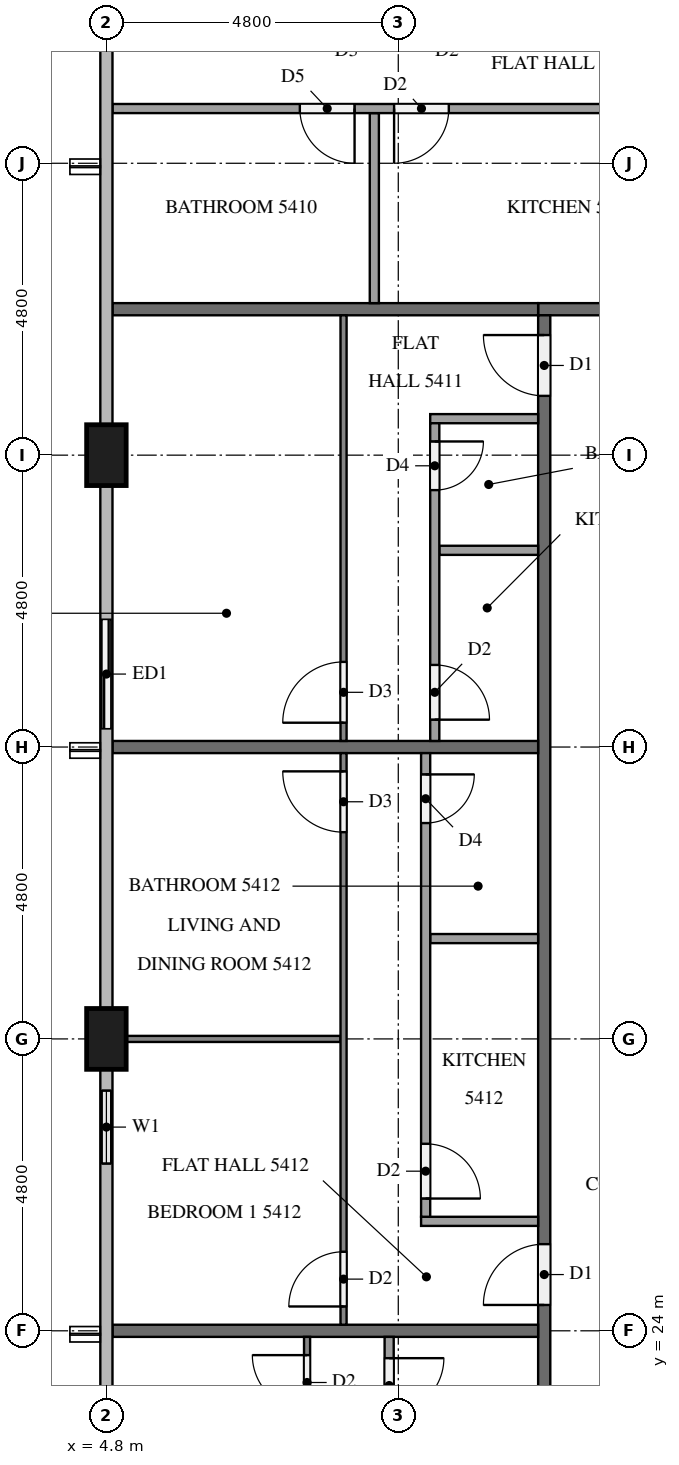
"""IFC4 building model, lengths in metres.
Left out: names, types, materials, properties, quantities, classifications, styles, units other than length and angle.
Written with IfcOpenShell. Run it as: python <this file> out.ifc"""

import sys

from ifc_helpers import new_model, si_unit, direction, frame, frame_2d, origin, origin_2d, place, context, subcontext, project, spatial, rectangle, extrude, element, fill, save


model = new_model("IFC4")
c1 = context("Model", 3, precision=1e-05, world=origin(), true_north=direction((0.0, 1.0)))
c2 = subcontext(c1, "Body", "Model", "MODEL_VIEW")
j1 = project(units=[si_unit("LENGTHUNIT", "METRE"), si_unit("PLANEANGLEUNIT", "RADIAN")], contexts=[c1])
p1 = place(None, origin())
s1 = spatial("IfcSite", under=j1, at=p1, CompositionType="ELEMENT")
p2 = place(p1, origin())
s2 = spatial("IfcBuilding", under=s1, at=p2, CompositionType="ELEMENT")
p3 = place(p2, frame((0.0, 0.0, 208.8)))
s3 = spatial("IfcBuildingStorey", under=s2, at=p3, CompositionType="ELEMENT", Elevation=208.8)
for number, where, z_axis, x_axis in (
    (1, (4.8, 38.4, 0.0), (0.0, 0.0, 1.0), (0.0, 1.0, 0.0)),
    (2, (4.8, 28.8, 0.0), (0.0, 0.0, 1.0), (0.0, 1.0, 0.0)),
):
    element("IfcColumn", number, at=place(p3, frame(where, z_axis=z_axis, x_axis=x_axis)), inside=s3, PredefinedType="COLUMN", context=c2, shape_type="SweptSolid", body=[
        extrude(rectangle(XDim=1.0, YDim=0.65, at=origin_2d()), origin(), (0.0, 0.0, 1.0), 3.2),
    ])
p4 = place(p3, frame((4.8, 36.0, 0.0), z_axis=(0.0, 0.0, 1.0), x_axis=(0.0, -1.0, 0.0)))
e3 = element("IfcWall", 3, at=p4, inside=s3, PredefinedType="SOLIDWALL", context=c2, shape_type="SweptSolid", body=[
    extrude(rectangle(XDim=2.4, YDim=0.15, at=frame_2d((1.2, 0.0))), origin(), (0.0, 0.0, 1.0), 3.2),
])
p5 = place(p4, frame((0.3, 0.0, 0.0)))
e4 = element("IfcOpeningElement", 4, at=p5, cuts=e3, PredefinedType="OPENING", context=c2, shape_type="SweptSolid", body=[
    extrude(rectangle(XDim=1.8, YDim=2.4, at=frame_2d((0.9, 1.2))), frame((0.0, 0.085, 0.0), z_axis=(0.0, -1.0, 0.0), x_axis=(1.0, 0.0, 0.0)), (0.0, 0.0, 1.0), 0.17),
])
p6 = place(p3, frame((4.8, 28.3, 0.0), z_axis=(0.0, 0.0, 1.0), x_axis=(0.0, -1.0, 0.0)))
e5 = element("IfcWall", 5, at=p6, inside=s3, PredefinedType="SOLIDWALL", context=c2, shape_type="SweptSolid", body=[
    extrude(rectangle(XDim=1.9, YDim=0.15, at=frame_2d((0.95, 0.0))), origin(), (0.0, 0.0, 1.0), 3.2),
])
p7 = place(p6, frame((0.35, 0.0, 0.9)))
e6 = element("IfcOpeningElement", 6, at=p7, cuts=e5, PredefinedType="OPENING", context=c2, shape_type="SweptSolid", body=[
    extrude(rectangle(XDim=1.2, YDim=1.4, at=frame_2d((0.6, 0.7))), frame((0.0, 0.085, 0.0), z_axis=(0.0, -1.0, 0.0), x_axis=(1.0, 0.0, 0.0)), (0.0, 0.0, 1.0), 0.17),
])
p8 = place(p3, frame((11.9, 40.8, 0.0), z_axis=(0.0, 0.0, 1.0), x_axis=(1.0, 0.0, 0.0)))
e7 = element("IfcWall", 7, at=p8, inside=s3, PredefinedType="PARTITIONING", context=c2, shape_type="SweptSolid", body=[
    extrude(rectangle(XDim=38.6, YDim=0.2, at=frame_2d((19.3, 0.0))), origin(), (0.0, 0.0, 1.0), 3.2),
])
p9 = place(p8, frame((36.525, 0.0, 0.0)))
e8 = element("IfcOpeningElement", 8, at=p9, cuts=e7, PredefinedType="OPENING", context=c2, shape_type="SweptSolid", body=[
    extrude(rectangle(XDim=1.0, YDim=2.1, at=frame_2d((0.5, 1.05))), frame((0.0, 0.11, 0.0), z_axis=(0.0, -1.0, 0.0), x_axis=(1.0, 0.0, 0.0)), (0.0, 0.0, 1.0), 0.22),
])
p10 = place(p8, frame((29.325, 0.0, 0.0)))
e9 = element("IfcOpeningElement", 9, at=p10, cuts=e7, PredefinedType="OPENING", context=c2, shape_type="SweptSolid", body=[
    extrude(rectangle(XDim=1.0, YDim=2.1, at=frame_2d((0.5, 1.05))), frame((0.0, 0.11, 0.0), z_axis=(0.0, -1.0, 0.0), x_axis=(1.0, 0.0, 0.0)), (0.0, 0.0, 1.0), 0.22),
])
p11 = place(p8, frame((12.525, 0.0, 0.0)))
e10 = element("IfcOpeningElement", 10, at=p11, cuts=e7, PredefinedType="OPENING", context=c2, shape_type="SweptSolid", body=[
    extrude(rectangle(XDim=1.0, YDim=2.1, at=frame_2d((0.5, 1.05))), frame((0.0, 0.11, 0.0), z_axis=(0.0, -1.0, 0.0), x_axis=(1.0, 0.0, 0.0)), (0.0, 0.0, 1.0), 0.22),
])
p12 = place(p8, frame((10.625, 0.0, 0.0)))
e11 = element("IfcOpeningElement", 11, at=p12, cuts=e7, PredefinedType="OPENING", context=c2, shape_type="SweptSolid", body=[
    extrude(rectangle(XDim=1.1, YDim=2.1, at=frame_2d((0.55, 1.05))), frame((0.0, 0.11, 0.0), z_axis=(0.0, -1.0, 0.0), x_axis=(1.0, 0.0, 0.0)), (0.0, 0.0, 1.0), 0.22),
])
p13 = place(p3, frame((12.0, 12.1, 0.0), z_axis=(0.0, 0.0, 1.0), x_axis=(0.0, 1.0, 0.0)))
e12 = element("IfcWall", 12, at=p13, inside=s3, PredefinedType="PARTITIONING", context=c2, shape_type="SweptSolid", body=[
    extrude(rectangle(XDim=28.6, YDim=0.2, at=frame_2d((14.3, 0.0))), origin(), (0.0, 0.0, 1.0), 3.2),
])
p14 = place(p13, frame((27.275, 0.0, 0.0)))
e13 = element("IfcOpeningElement", 13, at=p14, cuts=e12, PredefinedType="OPENING", context=c2, shape_type="SweptSolid", body=[
    extrude(rectangle(XDim=1.0, YDim=2.1, at=frame_2d((0.5, 1.05))), frame((0.0, 0.11, 0.0), z_axis=(0.0, -1.0, 0.0), x_axis=(1.0, 0.0, 0.0)), (0.0, 0.0, 1.0), 0.22),
])
p15 = place(p13, frame((12.325, 0.0, 0.0)))
e14 = element("IfcOpeningElement", 14, at=p15, cuts=e12, PredefinedType="OPENING", context=c2, shape_type="SweptSolid", body=[
    extrude(rectangle(XDim=1.0, YDim=2.1, at=frame_2d((0.5, 1.05))), frame((0.0, 0.11, 0.0), z_axis=(0.0, -1.0, 0.0), x_axis=(1.0, 0.0, 0.0)), (0.0, 0.0, 1.0), 0.22),
])
p16 = place(p13, frame((2.725, 0.0, 0.0)))
e15 = element("IfcOpeningElement", 15, at=p16, cuts=e12, PredefinedType="OPENING", context=c2, shape_type="SweptSolid", body=[
    extrude(rectangle(XDim=1.0, YDim=2.1, at=frame_2d((0.5, 1.05))), frame((0.0, 0.11, 0.0), z_axis=(0.0, -1.0, 0.0), x_axis=(1.0, 0.0, 0.0)), (0.0, 0.0, 1.0), 0.22),
])
p17 = place(p13, frame((0.875, 0.0, 0.0)))
e16 = element("IfcOpeningElement", 16, at=p17, cuts=e12, PredefinedType="OPENING", context=c2, shape_type="SweptSolid", body=[
    extrude(rectangle(XDim=1.0, YDim=2.1, at=frame_2d((0.5, 1.05))), frame((0.0, 0.11, 0.0), z_axis=(0.0, -1.0, 0.0), x_axis=(1.0, 0.0, 0.0)), (0.0, 0.0, 1.0), 0.22),
])
for number, where, z_axis, x_axis in (
    (17, (4.9, 40.8, 0.0), (0.0, 0.0, 1.0), (1.0, 0.0, 0.0)),
    (18, (4.9, 33.6, 0.0), (0.0, 0.0, 1.0), (1.0, 0.0, 0.0)),
    (19, (4.9, 24.0, 0.0), (0.0, 0.0, 1.0), (1.0, 0.0, 0.0)),
):
    element("IfcWall", number, at=place(p3, frame(where, z_axis=z_axis, x_axis=x_axis)), inside=s3, PredefinedType="PARTITIONING", context=c2, shape_type="SweptSolid", body=[
        extrude(rectangle(XDim=7.0, YDim=0.2, at=frame_2d((3.5, 0.0))), origin(), (0.0, 0.0, 1.0), 3.2),
    ])
p18 = place(p3, frame((9.206, 40.9, 0.0), z_axis=(0.0, 0.0, 1.0), x_axis=(0.0, 1.0, 0.0)))
e20 = element("IfcWall", 20, at=p18, inside=s3, PredefinedType="PARTITIONING", context=c2, shape_type="SweptSolid", body=[
    extrude(rectangle(XDim=3.125, YDim=0.15, at=frame_2d((1.562, 0.0))), origin(), (0.0, 0.0, 1.0), 3.2),
])
p19 = place(p3, frame((22.125, 44.1, 0.0), z_axis=(0.0, 0.0, 1.0), x_axis=(-1.0, 0.0, 0.0)))
e21 = element("IfcWall", 21, at=p19, inside=s3, PredefinedType="PARTITIONING", context=c2, shape_type="SweptSolid", body=[
    extrude(rectangle(XDim=17.225, YDim=0.15, at=frame_2d((8.613, 0.0))), origin(), (0.0, 0.0, 1.0), 3.2),
])
p20 = place(p19, frame((2.105, 0.0, 0.0)))
e22 = element("IfcOpeningElement", 22, at=p20, cuts=e21, PredefinedType="OPENING", context=c2, shape_type="SweptSolid", body=[
    extrude(rectangle(XDim=0.8, YDim=2.1, at=frame_2d((0.4, 1.05))), frame((0.0, 0.085, 0.0), z_axis=(0.0, -1.0, 0.0), x_axis=(1.0, 0.0, 0.0)), (0.0, 0.0, 1.0), 0.17),
])
p21 = place(p19, frame((3.555, 0.0, 0.0)))
e23 = element("IfcOpeningElement", 23, at=p21, cuts=e21, PredefinedType="OPENING", context=c2, shape_type="SweptSolid", body=[
    extrude(rectangle(XDim=0.8, YDim=2.1, at=frame_2d((0.4, 1.05))), frame((0.0, 0.085, 0.0), z_axis=(0.0, -1.0, 0.0), x_axis=(1.0, 0.0, 0.0)), (0.0, 0.0, 1.0), 0.17),
])
p22 = place(p19, frame((11.694, 0.0, 0.0)))
e24 = element("IfcOpeningElement", 24, at=p22, cuts=e21, PredefinedType="OPENING", context=c2, shape_type="SweptSolid", body=[
    extrude(rectangle(XDim=0.9, YDim=2.1, at=frame_2d((0.45, 1.05))), frame((0.0, 0.085, 0.0), z_axis=(0.0, -1.0, 0.0), x_axis=(1.0, 0.0, 0.0)), (0.0, 0.0, 1.0), 0.17),
])
p23 = place(p19, frame((13.244, 0.0, 0.0)))
e25 = element("IfcOpeningElement", 25, at=p23, cuts=e21, PredefinedType="OPENING", context=c2, shape_type="SweptSolid", body=[
    extrude(rectangle(XDim=0.9, YDim=2.1, at=frame_2d((0.45, 1.05))), frame((0.0, 0.085, 0.0), z_axis=(0.0, -1.0, 0.0), x_axis=(1.0, 0.0, 0.0)), (0.0, 0.0, 1.0), 0.17),
])
p24 = place(p3, frame((8.7, 33.7, 0.0), z_axis=(0.0, 0.0, 1.0), x_axis=(0.0, 1.0, 0.0)))
e26 = element("IfcWall", 26, at=p24, inside=s3, PredefinedType="PARTITIONING", context=c2, shape_type="SweptSolid", body=[
    extrude(rectangle(XDim=7.0, YDim=0.1, at=frame_2d((3.5, 0.0))), origin(), (0.0, 0.0, 1.0), 3.2),
])
p25 = place(p24, frame((0.3, 0.0, 0.0)))
e27 = element("IfcOpeningElement", 27, at=p25, cuts=e26, PredefinedType="OPENING", context=c2, shape_type="SweptSolid", body=[
    extrude(rectangle(XDim=1.0, YDim=2.1, at=frame_2d((0.5, 1.05))), frame((0.0, 0.06, 0.0), z_axis=(0.0, -1.0, 0.0), x_axis=(1.0, 0.0, 0.0)), (0.0, 0.0, 1.0), 0.12),
])
p26 = place(p3, frame((11.9, 36.835, 0.0), z_axis=(0.0, 0.0, 1.0), x_axis=(-1.0, 0.0, 0.0)))
e28 = element("IfcWall", 28, at=p26, inside=s3, PredefinedType="PARTITIONING", context=c2, shape_type="SweptSolid", body=[
    extrude(rectangle(XDim=1.625, YDim=0.15, at=frame_2d((0.812, 0.0))), origin(), (0.0, 0.0, 1.0), 3.2),
])
p27 = place(p3, frame((11.9, 39.0, 0.0), z_axis=(0.0, 0.0, 1.0), x_axis=(-1.0, 0.0, 0.0)))
e29 = element("IfcWall", 29, at=p27, inside=s3, PredefinedType="PARTITIONING", context=c2, shape_type="SweptSolid", body=[
    extrude(rectangle(XDim=1.775, YDim=0.15, at=frame_2d((0.887, 0.0))), origin(), (0.0, 0.0, 1.0), 3.2),
])
p28 = place(p3, frame((10.2, 38.925, 0.0), z_axis=(0.0, 0.0, 1.0), x_axis=(0.0, -1.0, 0.0)))
e30 = element("IfcWall", 30, at=p28, inside=s3, PredefinedType="PARTITIONING", context=c2, shape_type="SweptSolid", body=[
    extrude(rectangle(XDim=5.225, YDim=0.15, at=frame_2d((2.613, 0.0))), origin(), (0.0, 0.0, 1.0), 3.2),
])
p29 = place(p28, frame((0.3, 0.0, 0.0)))
e31 = element("IfcOpeningElement", 31, at=p29, cuts=e30, PredefinedType="OPENING", context=c2, shape_type="SweptSolid", body=[
    extrude(rectangle(XDim=0.8, YDim=2.1, at=frame_2d((0.4, 1.05))), frame((0.0, 0.085, 0.0), z_axis=(0.0, -1.0, 0.0), x_axis=(1.0, 0.0, 0.0)), (0.0, 0.0, 1.0), 0.17),
])
p30 = place(p28, frame((3.975, 0.0, 0.0)))
e32 = element("IfcOpeningElement", 32, at=p30, cuts=e30, PredefinedType="OPENING", context=c2, shape_type="SweptSolid", body=[
    extrude(rectangle(XDim=0.9, YDim=2.1, at=frame_2d((0.45, 1.05))), frame((0.0, 0.085, 0.0), z_axis=(0.0, -1.0, 0.0), x_axis=(1.0, 0.0, 0.0)), (0.0, 0.0, 1.0), 0.17),
])
p31 = place(p3, frame((8.65, 28.8, 0.0), z_axis=(0.0, 0.0, 1.0), x_axis=(-1.0, 0.0, 0.0)))
e33 = element("IfcWall", 33, at=p31, inside=s3, PredefinedType="PARTITIONING", context=c2, shape_type="SweptSolid", body=[
    extrude(rectangle(XDim=3.525, YDim=0.1, at=frame_2d((1.762, 0.0))), origin(), (0.0, 0.0, 1.0), 3.2),
])
p32 = place(p3, frame((8.7, 24.1, 0.0), z_axis=(0.0, 0.0, 1.0), x_axis=(0.0, 1.0, 0.0)))
e34 = element("IfcWall", 34, at=p32, inside=s3, PredefinedType="PARTITIONING", context=c2, shape_type="SweptSolid", body=[
    extrude(rectangle(XDim=9.4, YDim=0.1, at=frame_2d((4.7, 0.0))), origin(), (0.0, 0.0, 1.0), 3.2),
])
p33 = place(p32, frame((0.3, 0.0, 0.0)))
e35 = element("IfcOpeningElement", 35, at=p33, cuts=e34, PredefinedType="OPENING", context=c2, shape_type="SweptSolid", body=[
    extrude(rectangle(XDim=0.9, YDim=2.1, at=frame_2d((0.45, 1.05))), frame((0.0, 0.06, 0.0), z_axis=(0.0, -1.0, 0.0), x_axis=(1.0, 0.0, 0.0)), (0.0, 0.0, 1.0), 0.12),
])
p34 = place(p32, frame((8.1, 0.0, 0.0)))
e36 = element("IfcOpeningElement", 36, at=p34, cuts=e34, PredefinedType="OPENING", context=c2, shape_type="SweptSolid", body=[
    extrude(rectangle(XDim=1.0, YDim=2.1, at=frame_2d((0.5, 1.05))), frame((0.0, 0.06, 0.0), z_axis=(0.0, -1.0, 0.0), x_axis=(1.0, 0.0, 0.0)), (0.0, 0.0, 1.0), 0.12),
])
p35 = place(p3, frame((11.9, 30.45, 0.0), z_axis=(0.0, 0.0, 1.0), x_axis=(-1.0, 0.0, 0.0)))
e37 = element("IfcWall", 37, at=p35, inside=s3, PredefinedType="PARTITIONING", context=c2, shape_type="SweptSolid", body=[
    extrude(rectangle(XDim=1.775, YDim=0.15, at=frame_2d((0.887, 0.0))), origin(), (0.0, 0.0, 1.0), 3.2),
])
p36 = place(p3, frame((11.9, 25.8, 0.0), z_axis=(0.0, 0.0, 1.0), x_axis=(-1.0, 0.0, 0.0)))
e38 = element("IfcWall", 38, at=p36, inside=s3, PredefinedType="PARTITIONING", context=c2, shape_type="SweptSolid", body=[
    extrude(rectangle(XDim=1.925, YDim=0.15, at=frame_2d((0.962, 0.0))), origin(), (0.0, 0.0, 1.0), 3.2),
])
p37 = place(p3, frame((10.05, 33.5, 0.0), z_axis=(0.0, 0.0, 1.0), x_axis=(0.0, -1.0, 0.0)))
e39 = element("IfcWall", 39, at=p37, inside=s3, PredefinedType="PARTITIONING", context=c2, shape_type="SweptSolid", body=[
    extrude(rectangle(XDim=7.625, YDim=0.15, at=frame_2d((3.812, 0.0))), origin(), (0.0, 0.0, 1.0), 3.2),
])
p38 = place(p37, frame((6.425, 0.0, 0.0)))
e40 = element("IfcOpeningElement", 40, at=p38, cuts=e39, PredefinedType="OPENING", context=c2, shape_type="SweptSolid", body=[
    extrude(rectangle(XDim=0.9, YDim=2.1, at=frame_2d((0.45, 1.05))), frame((0.0, 0.085, 0.0), z_axis=(0.0, -1.0, 0.0), x_axis=(1.0, 0.0, 0.0)), (0.0, 0.0, 1.0), 0.17),
])
p39 = place(p37, frame((0.35, 0.0, 0.0)))
e41 = element("IfcOpeningElement", 41, at=p39, cuts=e39, PredefinedType="OPENING", context=c2, shape_type="SweptSolid", body=[
    extrude(rectangle(XDim=0.8, YDim=2.1, at=frame_2d((0.4, 1.05))), frame((0.0, 0.085, 0.0), z_axis=(0.0, -1.0, 0.0), x_axis=(1.0, 0.0, 0.0)), (0.0, 0.0, 1.0), 0.17),
])
p40 = place(p3, frame((8.1, 14.5, 0.0), z_axis=(0.0, 0.0, 1.0), x_axis=(0.0, 1.0, 0.0)))
e42 = element("IfcWall", 42, at=p40, inside=s3, PredefinedType="PARTITIONING", context=c2, shape_type="SweptSolid", body=[
    extrude(rectangle(XDim=9.4, YDim=0.1, at=frame_2d((4.7, 0.0))), origin(), (0.0, 0.0, 1.0), 3.2),
])
p41 = place(p40, frame((0.3, 0.0, 0.0)))
e43 = element("IfcOpeningElement", 43, at=p41, cuts=e42, PredefinedType="OPENING", context=c2, shape_type="SweptSolid", body=[
    extrude(rectangle(XDim=1.0, YDim=2.1, at=frame_2d((0.5, 1.05))), frame((0.0, 0.06, 0.0), z_axis=(0.0, -1.0, 0.0), x_axis=(1.0, 0.0, 0.0)), (0.0, 0.0, 1.0), 0.12),
])
p42 = place(p40, frame((8.2, 0.0, 0.0)))
e44 = element("IfcOpeningElement", 44, at=p42, cuts=e42, PredefinedType="OPENING", context=c2, shape_type="SweptSolid", body=[
    extrude(rectangle(XDim=0.9, YDim=2.1, at=frame_2d((0.45, 1.05))), frame((0.0, 0.06, 0.0), z_axis=(0.0, -1.0, 0.0), x_axis=(1.0, 0.0, 0.0)), (0.0, 0.0, 1.0), 0.12),
])
p43 = place(p3, frame((9.45, 23.9, 0.0), z_axis=(0.0, 0.0, 1.0), x_axis=(0.0, -1.0, 0.0)))
e45 = element("IfcWall", 45, at=p43, inside=s3, PredefinedType="PARTITIONING", context=c2, shape_type="SweptSolid", body=[
    extrude(rectangle(XDim=7.625, YDim=0.15, at=frame_2d((3.812, 0.0))), origin(), (0.0, 0.0, 1.0), 3.2),
])
p44 = place(p43, frame((6.525, 0.0, 0.0)))
e46 = element("IfcOpeningElement", 46, at=p44, cuts=e45, PredefinedType="OPENING", context=c2, shape_type="SweptSolid", body=[
    extrude(rectangle(XDim=0.8, YDim=2.1, at=frame_2d((0.4, 1.05))), frame((0.0, 0.085, 0.0), z_axis=(0.0, -1.0, 0.0), x_axis=(1.0, 0.0, 0.0)), (0.0, 0.0, 1.0), 0.17),
])
p45 = place(p43, frame((0.35, 0.0, 0.0)))
e47 = element("IfcOpeningElement", 47, at=p45, cuts=e45, PredefinedType="OPENING", context=c2, shape_type="SweptSolid", body=[
    extrude(rectangle(XDim=0.9, YDim=2.1, at=frame_2d((0.45, 1.05))), frame((0.0, 0.085, 0.0), z_axis=(0.0, -1.0, 0.0), x_axis=(1.0, 0.0, 0.0)), (0.0, 0.0, 1.0), 0.17),
])
p46 = place(p5, origin())
e48 = element("IfcDoor", 48, at=p46, inside=s3, OperationType="SLIDING_TO_LEFT", PredefinedType="DOOR", context=c2, shape_type="SweptSolid", body=[
    extrude(rectangle(XDim=1.8, YDim=2.4, at=frame_2d((0.9, 1.2))), frame((0.0, 0.025, 0.0), z_axis=(0.0, -1.0, 0.0), x_axis=(1.0, 0.0, 0.0)), (0.0, 0.0, 1.0), 0.05),
])
fill(e4, e48)
p47 = place(p7, origin())
e49 = element("IfcWindow", 49, at=p47, inside=s3, PartitioningType="SINGLE_PANEL", PredefinedType="WINDOW", context=c2, shape_type="SweptSolid", body=[
    extrude(rectangle(XDim=1.2, YDim=1.4, at=frame_2d((0.6, 0.7))), frame((0.0, 0.03, 0.0), z_axis=(0.0, -1.0, 0.0), x_axis=(1.0, 0.0, 0.0)), (0.0, 0.0, 1.0), 0.06),
])
fill(e6, e49)
p48 = place(p14, origin())
e50 = element("IfcDoor", 50, at=p48, inside=s3, OperationType="SINGLE_SWING_RIGHT", PredefinedType="DOOR", context=c2, shape_type="SweptSolid", body=[
    extrude(rectangle(XDim=1.0, YDim=2.1, at=frame_2d((0.5, 1.05))), frame((0.0, 0.025, 0.0), z_axis=(0.0, -1.0, 0.0), x_axis=(1.0, 0.0, 0.0)), (0.0, 0.0, 1.0), 0.05),
])
fill(e13, e50)
p49 = place(p15, origin())
e51 = element("IfcDoor", 51, at=p49, inside=s3, OperationType="SINGLE_SWING_LEFT", PredefinedType="DOOR", context=c2, shape_type="SweptSolid", body=[
    extrude(rectangle(XDim=1.0, YDim=2.1, at=frame_2d((0.5, 1.05))), frame((0.0, 0.025, 0.0), z_axis=(0.0, -1.0, 0.0), x_axis=(1.0, 0.0, 0.0)), (0.0, 0.0, 1.0), 0.05),
])
fill(e14, e51)
p50 = place(p22, origin())
e52 = element("IfcDoor", 52, at=p50, inside=s3, OperationType="SINGLE_SWING_RIGHT", PredefinedType="DOOR", context=c2, shape_type="SweptSolid", body=[
    extrude(rectangle(XDim=0.9, YDim=2.1, at=frame_2d((0.45, 1.05))), frame((0.0, 0.025, 0.0), z_axis=(0.0, -1.0, 0.0), x_axis=(1.0, 0.0, 0.0)), (0.0, 0.0, 1.0), 0.05),
])
fill(e24, e52)
p51 = place(p23, origin())
e53 = element("IfcDoor", 53, at=p51, inside=s3, OperationType="SINGLE_SWING_LEFT", PredefinedType="DOOR", context=c2, shape_type="SweptSolid", body=[
    extrude(rectangle(XDim=0.9, YDim=2.1, at=frame_2d((0.45, 1.05))), frame((0.0, 0.025, 0.0), z_axis=(0.0, -1.0, 0.0), x_axis=(1.0, 0.0, 0.0)), (0.0, 0.0, 1.0), 0.05),
])
fill(e25, e53)
p52 = place(p25, origin())
e54 = element("IfcDoor", 54, at=p52, inside=s3, OperationType="SINGLE_SWING_LEFT", PredefinedType="DOOR", context=c2, shape_type="SweptSolid", body=[
    extrude(rectangle(XDim=1.0, YDim=2.1, at=frame_2d((0.5, 1.05))), frame((0.0, 0.025, 0.0), z_axis=(0.0, -1.0, 0.0), x_axis=(1.0, 0.0, 0.0)), (0.0, 0.0, 1.0), 0.05),
])
fill(e27, e54)
p53 = place(p29, origin())
e55 = element("IfcDoor", 55, at=p53, inside=s3, OperationType="SINGLE_SWING_LEFT", PredefinedType="DOOR", context=c2, shape_type="SweptSolid", body=[
    extrude(rectangle(XDim=0.8, YDim=2.1, at=frame_2d((0.4, 1.05))), frame((0.0, 0.025, 0.0), z_axis=(0.0, -1.0, 0.0), x_axis=(1.0, 0.0, 0.0)), (0.0, 0.0, 1.0), 0.05),
])
fill(e31, e55)
p54 = place(p30, origin())
e56 = element("IfcDoor", 56, at=p54, inside=s3, OperationType="SINGLE_SWING_RIGHT", PredefinedType="DOOR", context=c2, shape_type="SweptSolid", body=[
    extrude(rectangle(XDim=0.9, YDim=2.1, at=frame_2d((0.45, 1.05))), frame((0.0, 0.025, 0.0), z_axis=(0.0, -1.0, 0.0), x_axis=(1.0, 0.0, 0.0)), (0.0, 0.0, 1.0), 0.05),
])
fill(e32, e56)
p55 = place(p33, origin())
e57 = element("IfcDoor", 57, at=p55, inside=s3, OperationType="SINGLE_SWING_LEFT", PredefinedType="DOOR", context=c2, shape_type="SweptSolid", body=[
    extrude(rectangle(XDim=0.9, YDim=2.1, at=frame_2d((0.45, 1.05))), frame((0.0, 0.025, 0.0), z_axis=(0.0, -1.0, 0.0), x_axis=(1.0, 0.0, 0.0)), (0.0, 0.0, 1.0), 0.05),
])
fill(e35, e57)
p56 = place(p34, origin())
e58 = element("IfcDoor", 58, at=p56, inside=s3, OperationType="SINGLE_SWING_RIGHT", PredefinedType="DOOR", context=c2, shape_type="SweptSolid", body=[
    extrude(rectangle(XDim=1.0, YDim=2.1, at=frame_2d((0.5, 1.05))), frame((0.0, 0.025, 0.0), z_axis=(0.0, -1.0, 0.0), x_axis=(1.0, 0.0, 0.0)), (0.0, 0.0, 1.0), 0.05),
])
fill(e36, e58)
p57 = place(p38, origin())
e59 = element("IfcDoor", 59, at=p57, inside=s3, OperationType="SINGLE_SWING_RIGHT", PredefinedType="DOOR", context=c2, shape_type="SweptSolid", body=[
    extrude(rectangle(XDim=0.9, YDim=2.1, at=frame_2d((0.45, 1.05))), frame((0.0, 0.025, 0.0), z_axis=(0.0, -1.0, 0.0), x_axis=(1.0, 0.0, 0.0)), (0.0, 0.0, 1.0), 0.05),
])
fill(e40, e59)
p58 = place(p39, origin())
e60 = element("IfcDoor", 60, at=p58, inside=s3, OperationType="SINGLE_SWING_LEFT", PredefinedType="DOOR", context=c2, shape_type="SweptSolid", body=[
    extrude(rectangle(XDim=0.8, YDim=2.1, at=frame_2d((0.4, 1.05))), frame((0.0, 0.025, 0.0), z_axis=(0.0, -1.0, 0.0), x_axis=(1.0, 0.0, 0.0)), (0.0, 0.0, 1.0), 0.05),
])
fill(e41, e60)
p59 = place(p42, origin())
e61 = element("IfcDoor", 61, at=p59, inside=s3, OperationType="SINGLE_SWING_RIGHT", PredefinedType="DOOR", context=c2, shape_type="SweptSolid", body=[
    extrude(rectangle(XDim=0.9, YDim=2.1, at=frame_2d((0.45, 1.05))), frame((0.0, 0.025, 0.0), z_axis=(0.0, -1.0, 0.0), x_axis=(1.0, 0.0, 0.0)), (0.0, 0.0, 1.0), 0.05),
])
fill(e44, e61)
p60 = place(p45, origin())
e62 = element("IfcDoor", 62, at=p60, inside=s3, OperationType="SINGLE_SWING_LEFT", PredefinedType="DOOR", context=c2, shape_type="SweptSolid", body=[
    extrude(rectangle(XDim=0.9, YDim=2.1, at=frame_2d((0.45, 1.05))), frame((0.0, 0.025, 0.0), z_axis=(0.0, -1.0, 0.0), x_axis=(1.0, 0.0, 0.0)), (0.0, 0.0, 1.0), 0.05),
])
fill(e47, e62)
save(model, sys.argv[1])
